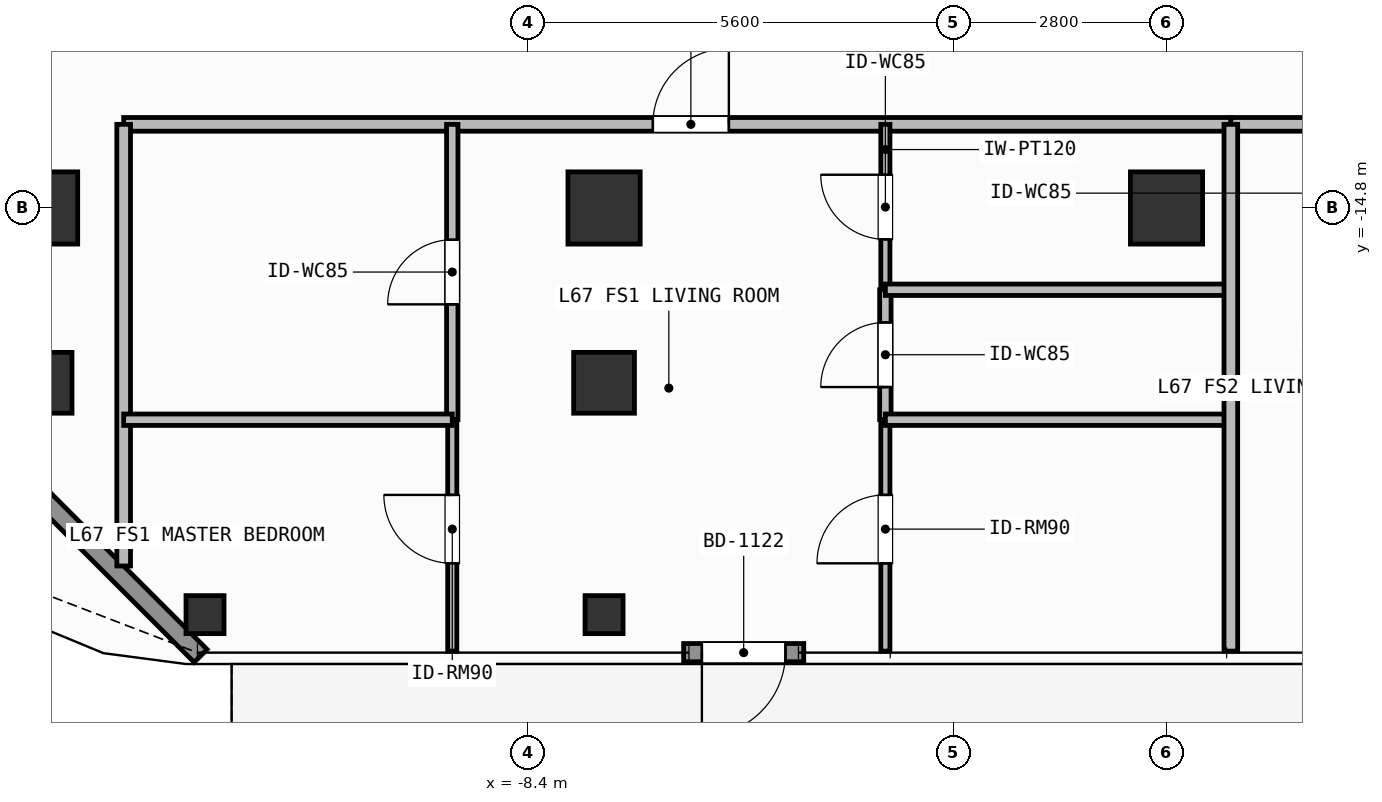
"""IFC4 building model, lengths in metres.
Left out: names, types, materials, properties, quantities, classifications, styles, units other than length and angle.
Written with IfcOpenShell. Run it as: python <this file> out.ifc"""

import sys

from ifc_helpers import new_model, si_unit, direction, frame, frame_2d, origin, origin_2d, place, context, subcontext, project, spatial, rectangle, hollow_rectangle, extrude, element, fill, save


model = new_model("IFC4")
c1 = context("Model", 3, precision=1e-05, world=origin(), true_north=direction((0.0, 1.0)))
c2 = subcontext(c1, "Body", "Model", "MODEL_VIEW")
j1 = project(units=[si_unit("LENGTHUNIT", "METRE"), si_unit("PLANEANGLEUNIT", "RADIAN")], contexts=[c1])
p1 = place(None, origin())
s1 = spatial("IfcSite", under=j1, at=p1, CompositionType="ELEMENT")
p2 = place(p1, origin())
s2 = spatial("IfcBuilding", under=s1, at=p2, CompositionType="ELEMENT")
p3 = place(p2, frame((0.0, 0.0, 274.2)))
s3 = spatial("IfcBuildingStorey", under=s2, at=p3, CompositionType="ELEMENT", Elevation=274.2)
for number, where, z_axis, x_axis in (
    (1, (-14.8, -14.8, 0.0), (0.0, 0.0, 1.0), (1.0, 0.0, 0.0)),
    (2, (-7.4, -14.8, 0.0), (0.0, 0.0, 1.0), (1.0, 0.0, 0.0)),
    (3, (0.0, -14.8, 0.0), (0.0, 0.0, 1.0), (1.0, 0.0, 0.0)),
):
    element("IfcColumn", number, at=place(p3, frame(where, z_axis=z_axis, x_axis=x_axis)), inside=s3, PredefinedType="COLUMN", context=c2, shape_type="SweptSolid", body=[
        extrude(rectangle(XDim=0.95, YDim=0.95, at=origin_2d()), origin(), (0.0, 0.0, 1.0), 3.9),
    ])
for number, where, z_axis, x_axis in (
    (4, (-14.8, -17.1, 0.0), (0.0, 0.0, 1.0), (1.0, 0.0, 0.0)),
    (5, (-7.4, -17.1, 0.0), (0.0, 0.0, 1.0), (1.0, 0.0, 0.0)),
):
    element("IfcColumn", number, at=place(p3, frame(where, z_axis=z_axis, x_axis=x_axis)), inside=s3, PredefinedType="COLUMN", context=c2, shape_type="SweptSolid", body=[
        extrude(hollow_rectangle(XDim=0.8, YDim=0.8, WallThickness=0.036, at=origin_2d()), origin(), (0.0, 0.0, 1.0), 3.9),
    ])
for number, where, z_axis, x_axis in (
    (6, (-12.65, -20.15, 0.0), (0.0, 0.0, 1.0), (1.0, 0.0, 0.0)),
    (7, (-7.4, -20.15, 0.0), (0.0, 0.0, 1.0), (1.0, 0.0, 0.0)),
):
    element("IfcColumn", number, at=place(p3, frame(where, z_axis=z_axis, x_axis=x_axis)), inside=s3, PredefinedType="COLUMN", context=c2, shape_type="SweptSolid", body=[
        extrude(hollow_rectangle(XDim=0.5, YDim=0.5, WallThickness=0.025, at=origin_2d()), origin(), (0.0, 0.0, 1.0), 3.9),
    ])
p4 = place(p3, frame((-4.773, -20.65, 0.0), z_axis=(0.0, 0.0, 1.0), x_axis=(-1.0, 0.0, 0.0)))
e8 = element("IfcWall", 8, at=p4, inside=s3, PredefinedType="SOLIDWALL", context=c2, shape_type="SweptSolid", body=[
    extrude(rectangle(XDim=1.58, YDim=0.24, at=frame_2d((0.79, 0.0))), origin(), (0.0, 0.0, 1.0), 3.68),
])
p5 = place(p4, frame((0.24, 0.0, 0.0)))
e9 = element("IfcOpeningElement", 9, at=p5, cuts=e8, PredefinedType="OPENING", context=c2, shape_type="SweptSolid", body=[
    extrude(rectangle(XDim=1.1, YDim=2.2, at=frame_2d((0.55, 1.1))), frame((0.0, 0.13, 0.0), z_axis=(0.0, -1.0, 0.0), x_axis=(1.0, 0.0, 0.0)), (0.0, 0.0, 1.0), 0.26),
])
p6 = place(p3, frame((-12.708, -20.692, 0.0), z_axis=(0.0, 0.0, 1.0), x_axis=(-0.707126925818, 0.707086635981, 0.0)))
e10 = element("IfcWall", 10, at=p6, inside=s3, PredefinedType="SOLIDWALL", context=c2, shape_type="SweptSolid", body=[
    extrude(rectangle(XDim=6.06, YDim=0.24, at=frame_2d((3.03, 0.0))), origin(), (0.0, 0.0, 1.0), 3.68),
])
p7 = place(p3, frame((-13.72, -13.7, 0.0), z_axis=(0.0, 0.0, 1.0), x_axis=(1.0, 0.0, 0.0)))
e11 = element("IfcWall", 11, at=p7, inside=s3, PredefinedType="PARTITIONING", context=c2, shape_type="SweptSolid", body=[
    extrude(rectangle(XDim=14.566, YDim=0.18, at=frame_2d((7.283, 0.0))), origin(), (0.0, 0.0, 1.0), 3.68),
])
p8 = place(p7, frame((6.962, 0.0, 0.0)))
e12 = element("IfcOpeningElement", 12, at=p8, cuts=e11, PredefinedType="OPENING", context=c2, shape_type="SweptSolid", body=[
    extrude(rectangle(XDim=1.0, YDim=2.2, at=frame_2d((0.5, 1.1))), frame((0.0, 0.1, 0.0), z_axis=(0.0, -1.0, 0.0), x_axis=(1.0, 0.0, 0.0)), (0.0, 0.0, 1.0), 0.2),
])
p9 = place(p3, frame((-9.397, -17.586, 0.0), z_axis=(0.0, 0.0, 1.0), x_axis=(0.0, 1.0, 0.0)))
e13 = element("IfcWall", 13, at=p9, inside=s3, PredefinedType="PARTITIONING", context=c2, shape_type="SweptSolid", body=[
    extrude(rectangle(XDim=3.886, YDim=0.15, at=frame_2d((1.943, 0.0))), origin(), (0.0, 0.0, 1.0), 3.68),
])
p10 = place(p9, frame((1.518, 0.0, 0.0)))
e14 = element("IfcOpeningElement", 14, at=p10, cuts=e13, PredefinedType="OPENING", context=c2, shape_type="SweptSolid", body=[
    extrude(rectangle(XDim=0.85, YDim=2.1, at=frame_2d((0.425, 1.05))), frame((0.0, 0.085, 0.0), z_axis=(0.0, -1.0, 0.0), x_axis=(1.0, 0.0, 0.0)), (0.0, 0.0, 1.0), 0.17),
])
p11 = place(p3, frame((-9.397, -20.63, 0.0), z_axis=(0.0, 0.0, 1.0), x_axis=(0.0, 1.0, 0.0)))
e15 = element("IfcWall", 15, at=p11, inside=s3, PredefinedType="PARTITIONING", context=c2, shape_type="SweptSolid", body=[
    extrude(rectangle(XDim=3.044, YDim=0.12, at=frame_2d((1.522, 0.0))), origin(), (0.0, 0.0, 1.0), 3.68),
])
p12 = place(p11, frame((1.155, 0.0, 0.0)))
e16 = element("IfcOpeningElement", 16, at=p12, cuts=e15, PredefinedType="OPENING", context=c2, shape_type="SweptSolid", body=[
    extrude(rectangle(XDim=0.9, YDim=2.1, at=frame_2d((0.45, 1.05))), frame((0.0, 0.07, 0.0), z_axis=(0.0, -1.0, 0.0), x_axis=(1.0, 0.0, 0.0)), (0.0, 0.0, 1.0), 0.14),
])
p13 = place(p3, frame((-3.699, -17.586, 0.0), z_axis=(0.0, 0.0, 1.0), x_axis=(0.0, 1.0, 0.0)))
e17 = element("IfcWall", 17, at=p13, inside=s3, PredefinedType="PARTITIONING", context=c2, shape_type="SweptSolid", body=[
    extrude(rectangle(XDim=1.71, YDim=0.15, at=frame_2d((0.855, 0.0))), origin(), (0.0, 0.0, 1.0), 3.68),
])
p14 = place(p13, frame((0.43, 0.0, 0.0)))
e18 = element("IfcOpeningElement", 18, at=p14, cuts=e17, PredefinedType="OPENING", context=c2, shape_type="SweptSolid", body=[
    extrude(rectangle(XDim=0.85, YDim=2.1, at=frame_2d((0.425, 1.05))), frame((0.0, 0.085, 0.0), z_axis=(0.0, -1.0, 0.0), x_axis=(1.0, 0.0, 0.0)), (0.0, 0.0, 1.0), 0.17),
])
p15 = place(p3, frame((-3.699, -15.876, 0.0), z_axis=(0.0, 0.0, 1.0), x_axis=(0.0, 1.0, 0.0)))
e19 = element("IfcWall", 19, at=p15, inside=s3, PredefinedType="PARTITIONING", context=c2, shape_type="SweptSolid", body=[
    extrude(rectangle(XDim=2.176, YDim=0.12, at=frame_2d((1.088, 0.0))), origin(), (0.0, 0.0, 1.0), 3.68),
])
p16 = place(p15, frame((0.663, 0.0, 0.0)))
e20 = element("IfcOpeningElement", 20, at=p16, cuts=e19, PredefinedType="OPENING", context=c2, shape_type="SweptSolid", body=[
    extrude(rectangle(XDim=0.85, YDim=2.1, at=frame_2d((0.425, 1.05))), frame((0.0, 0.07, 0.0), z_axis=(0.0, -1.0, 0.0), x_axis=(1.0, 0.0, 0.0)), (0.0, 0.0, 1.0), 0.14),
])
p17 = place(p3, frame((-3.699, -20.63, 0.0), z_axis=(0.0, 0.0, 1.0), x_axis=(0.0, 1.0, 0.0)))
e21 = element("IfcWall", 21, at=p17, inside=s3, PredefinedType="PARTITIONING", context=c2, shape_type="SweptSolid", body=[
    extrude(rectangle(XDim=3.044, YDim=0.12, at=frame_2d((1.522, 0.0))), origin(), (0.0, 0.0, 1.0), 3.68),
])
p18 = place(p17, frame((1.155, 0.0, 0.0)))
e22 = element("IfcOpeningElement", 22, at=p18, cuts=e21, PredefinedType="OPENING", context=c2, shape_type="SweptSolid", body=[
    extrude(rectangle(XDim=0.9, YDim=2.1, at=frame_2d((0.45, 1.05))), frame((0.0, 0.07, 0.0), z_axis=(0.0, -1.0, 0.0), x_axis=(1.0, 0.0, 0.0)), (0.0, 0.0, 1.0), 0.14),
])
p19 = place(p3, frame((0.846, -13.7, 0.0), z_axis=(0.0, 0.0, 1.0), x_axis=(1.0, 0.0, 0.0)))
e23 = element("IfcWall", 23, at=p19, inside=s3, PredefinedType="PARTITIONING", context=c2, shape_type="SweptSolid", body=[
    extrude(rectangle(XDim=7.659, YDim=0.18, at=frame_2d((3.83, 0.0))), origin(), (0.0, 0.0, 1.0), 3.68),
])
p20 = place(p19, frame((1.569, 0.0, 0.0)))
e24 = element("IfcOpeningElement", 24, at=p20, cuts=e23, PredefinedType="OPENING", context=c2, shape_type="SweptSolid", body=[
    extrude(rectangle(XDim=1.0, YDim=2.2, at=frame_2d((0.5, 1.1))), frame((0.0, 0.1, 0.0), z_axis=(0.0, -1.0, 0.0), x_axis=(1.0, 0.0, 0.0)), (0.0, 0.0, 1.0), 0.2),
])
p21 = place(p3, frame((-13.72, -19.51, 0.0), z_axis=(0.0, 0.0, 1.0), x_axis=(0.0, 1.0, 0.0)))
e25 = element("IfcWall", 25, at=p21, inside=s3, PredefinedType="PARTITIONING", context=c2, shape_type="SweptSolid", body=[
    extrude(rectangle(XDim=5.81, YDim=0.18, at=frame_2d((2.905, 0.0))), origin(), (0.0, 0.0, 1.0), 3.68),
])
p22 = place(p3, frame((-13.72, -17.586, 0.0), z_axis=(0.0, 0.0, 1.0), x_axis=(1.0, 0.0, 0.0)))
e26 = element("IfcWall", 26, at=p22, inside=s3, PredefinedType="PARTITIONING", context=c2, shape_type="SweptSolid", body=[
    extrude(rectangle(XDim=4.323, YDim=0.15, at=frame_2d((2.162, 0.0))), origin(), (0.0, 0.0, 1.0), 3.68),
])
for number, where, z_axis, x_axis in (
    (27, (-3.699, -15.876, 0.0), (0.0, 0.0, 1.0), (1.0, 0.0, 0.0)),
    (28, (-3.699, -17.586, 0.0), (0.0, 0.0, 1.0), (1.0, 0.0, 0.0)),
):
    element("IfcWall", number, at=place(p3, frame(where, z_axis=z_axis, x_axis=x_axis)), inside=s3, PredefinedType="PARTITIONING", context=c2, shape_type="SweptSolid", body=[
        extrude(rectangle(XDim=4.545, YDim=0.15, at=frame_2d((2.272, 0.0))), origin(), (0.0, 0.0, 1.0), 3.68),
    ])
p23 = place(p3, frame((0.846, -20.63, 0.0), z_axis=(0.0, 0.0, 1.0), x_axis=(0.0, 1.0, 0.0)))
e29 = element("IfcWall", 29, at=p23, inside=s3, PredefinedType="PARTITIONING", context=c2, shape_type="SweptSolid", body=[
    extrude(rectangle(XDim=6.93, YDim=0.18, at=frame_2d((3.465, 0.0))), origin(), (0.0, 0.0, 1.0), 3.68),
])
p24 = place(p5, origin())
e30 = element("IfcDoor", 30, at=p24, inside=s3, OperationType="SINGLE_SWING_RIGHT", PredefinedType="DOOR", context=c2, shape_type="SweptSolid", body=[
    extrude(rectangle(XDim=1.1, YDim=2.2, at=frame_2d((0.55, 1.1))), frame((0.0, 0.025, 0.0), z_axis=(0.0, -1.0, 0.0), x_axis=(1.0, 0.0, 0.0)), (0.0, 0.0, 1.0), 0.05),
])
fill(e9, e30)
p25 = place(p8, origin())
e31 = element("IfcDoor", 31, at=p25, inside=s3, OperationType="SINGLE_SWING_RIGHT", PredefinedType="DOOR", context=c2, shape_type="SweptSolid", body=[
    extrude(rectangle(XDim=1.0, YDim=2.2, at=frame_2d((0.5, 1.1))), frame((0.0, 0.025, 0.0), z_axis=(0.0, -1.0, 0.0), x_axis=(1.0, 0.0, 0.0)), (0.0, 0.0, 1.0), 0.05),
])
fill(e12, e31)
p26 = place(p10, origin())
e32 = element("IfcDoor", 32, at=p26, inside=s3, OperationType="SINGLE_SWING_LEFT", PredefinedType="DOOR", context=c2, shape_type="SweptSolid", body=[
    extrude(rectangle(XDim=0.85, YDim=2.1, at=frame_2d((0.425, 1.05))), frame((0.0, 0.025, 0.0), z_axis=(0.0, -1.0, 0.0), x_axis=(1.0, 0.0, 0.0)), (0.0, 0.0, 1.0), 0.05),
])
fill(e14, e32)
p27 = place(p12, origin())
e33 = element("IfcDoor", 33, at=p27, inside=s3, OperationType="SINGLE_SWING_RIGHT", PredefinedType="DOOR", context=c2, shape_type="SweptSolid", body=[
    extrude(rectangle(XDim=0.9, YDim=2.1, at=frame_2d((0.45, 1.05))), frame((0.0, 0.025, 0.0), z_axis=(0.0, -1.0, 0.0), x_axis=(1.0, 0.0, 0.0)), (0.0, 0.0, 1.0), 0.05),
])
fill(e16, e33)
p28 = place(p14, origin())
e34 = element("IfcDoor", 34, at=p28, inside=s3, OperationType="SINGLE_SWING_LEFT", PredefinedType="DOOR", context=c2, shape_type="SweptSolid", body=[
    extrude(rectangle(XDim=0.85, YDim=2.1, at=frame_2d((0.425, 1.05))), frame((0.0, 0.025, 0.0), z_axis=(0.0, -1.0, 0.0), x_axis=(1.0, 0.0, 0.0)), (0.0, 0.0, 1.0), 0.05),
])
fill(e18, e34)
p29 = place(p16, origin())
e35 = element("IfcDoor", 35, at=p29, inside=s3, OperationType="SINGLE_SWING_RIGHT", PredefinedType="DOOR", context=c2, shape_type="SweptSolid", body=[
    extrude(rectangle(XDim=0.85, YDim=2.1, at=frame_2d((0.425, 1.05))), frame((0.0, 0.025, 0.0), z_axis=(0.0, -1.0, 0.0), x_axis=(1.0, 0.0, 0.0)), (0.0, 0.0, 1.0), 0.05),
])
fill(e20, e35)
p30 = place(p18, origin())
e36 = element("IfcDoor", 36, at=p30, inside=s3, OperationType="SINGLE_SWING_LEFT", PredefinedType="DOOR", context=c2, shape_type="SweptSolid", body=[
    extrude(rectangle(XDim=0.9, YDim=2.1, at=frame_2d((0.45, 1.05))), frame((0.0, 0.025, 0.0), z_axis=(0.0, -1.0, 0.0), x_axis=(1.0, 0.0, 0.0)), (0.0, 0.0, 1.0), 0.05),
])
fill(e22, e36)
save(model, sys.argv[1])
